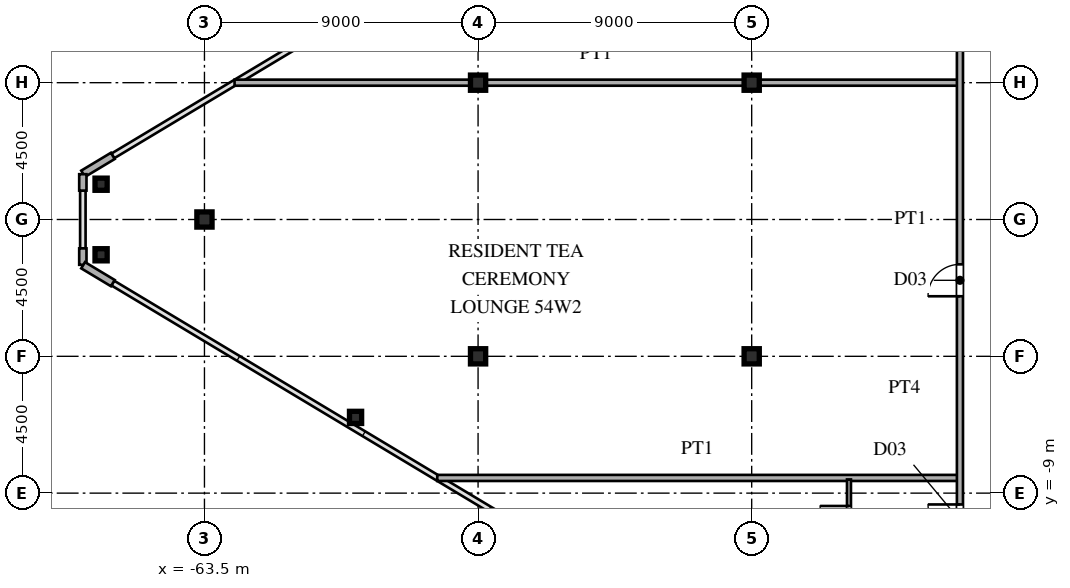
"""IFC4 building model, lengths in metres.
Left out: names, types, materials, properties, quantities, classifications, styles, units other than length and angle.
Written with IfcOpenShell. Run it as: python <this file> out.ifc"""

import sys

from ifc_helpers import new_model, si_unit, direction, frame, frame_2d, origin, origin_2d, place, context, subcontext, project, spatial, rectangle, hollow_rectangle, i_section, extrude, source, transform, mapped, element, fill, save


model = new_model("IFC4")
c1 = context("Model", 3, precision=1e-05, world=origin(), true_north=direction((0.0, 1.0)))
c2 = subcontext(c1, "Body", "Model", "MODEL_VIEW")
j1 = project(units=[si_unit("LENGTHUNIT", "METRE"), si_unit("PLANEANGLEUNIT", "RADIAN")], contexts=[c1])
p1 = place(None, origin())
s1 = spatial("IfcSite", under=j1, at=p1, CompositionType="ELEMENT")
p2 = place(p1, origin())
s2 = spatial("IfcBuilding", under=s1, at=p2, CompositionType="ELEMENT")
p3 = place(p2, frame((0.0, 0.0, 203.1)))
s3 = spatial("IfcBuildingStorey", under=s2, at=p3, CompositionType="ELEMENT", Elevation=203.1)
m1 = source(origin(), c2, "Body", "SweptSolid", [
    extrude(i_section(OverallWidth=0.5, OverallDepth=0.5, WebThickness=0.02, FlangeThickness=0.032, at=origin_2d()), origin(), (0.0, 0.0, 1.0), 3.6),
])
for number, where, z_axis, x_axis in (
    (1, (-45.5, -4.5, 0.0), (0.0, 0.0, 1.0), (1.0, 0.0, 0.0)),
    (2, (-45.5, 4.5, 0.0), (0.0, 0.0, 1.0), (1.0, 0.0, 0.0)),
    (3, (-54.5, -4.5, 0.0), (0.0, 0.0, 1.0), (1.0, 0.0, 0.0)),
    (4, (-54.5, 4.5, 0.0), (0.0, 0.0, 1.0), (1.0, 0.0, 0.0)),
    (5, (-63.5, 0.0, 0.0), (0.0, 0.0, 1.0), (1.0, 0.0, 0.0)),
):
    element("IfcColumn", number, at=place(p3, frame(where, z_axis=z_axis, x_axis=x_axis)), inside=s3, PredefinedType="COLUMN", context=c2, shape_type="MappedRepresentation", body=[
        mapped(m1, transform((0.0, 0.0, 0.0), scale=1.0)),
    ])
m2 = source(origin(), c2, "Body", "SweptSolid", [
    extrude(hollow_rectangle(XDim=0.4, YDim=0.4, WallThickness=0.016, at=origin_2d()), origin(), (0.0, 0.0, 1.0), 3.6),
])
for number, where, z_axis, x_axis in (
    (6, (-66.9, 1.16, 0.0), (0.0, 0.0, 1.0), (1.0, 0.0, 0.0)),
    (7, (-66.9, -1.16, 0.0), (0.0, 0.0, 1.0), (1.0, 0.0, 0.0)),
    (8, (-58.53, -6.509, 0.0), (0.0, 0.0, 1.0), (1.0, 0.0, 0.0)),
):
    element("IfcColumn", number, at=place(p3, frame(where, z_axis=z_axis, x_axis=x_axis)), inside=s3, PredefinedType="COLUMN", context=c2, shape_type="MappedRepresentation", body=[
        mapped(m2, transform((0.0, 0.0, 0.0), scale=1.0)),
    ])
p4 = place(p3, frame((-66.514, 2.092, 0.0), z_axis=(0.0, 0.0, 1.0), x_axis=(-0.85743623509, -0.514590228002, 0.0)))
e9 = element("IfcWall", 9, at=p4, inside=s3, PredefinedType="SOLIDWALL", context=c2, shape_type="SweptSolid", body=[
    extrude(rectangle(XDim=1.14, YDim=0.24, at=frame_2d((0.57, 0.0))), origin(), (0.0, 0.0, 1.0), 3.38),
])
for number, where, z_axis, x_axis in (
    (10, (-67.5, 1.49, 0.0), (0.0, 0.0, 1.0), (0.0, -1.0, 0.0)),
    (11, (-67.5, -0.95, 0.0), (0.0, 0.0, 1.0), (0.0, -1.0, 0.0)),
):
    element("IfcWall", number, at=place(p3, frame(where, z_axis=z_axis, x_axis=x_axis)), inside=s3, PredefinedType="SOLIDWALL", context=c2, shape_type="SweptSolid", body=[
        extrude(rectangle(XDim=0.54, YDim=0.24, at=frame_2d((0.27, 0.0))), origin(), (0.0, 0.0, 1.0), 3.38),
    ])
p5 = place(p3, frame((-67.491, -1.505, 0.0), z_axis=(0.0, 0.0, 1.0), x_axis=(0.85743623509, -0.514590228002, 0.0)))
e12 = element("IfcWall", 12, at=p5, inside=s3, PredefinedType="SOLIDWALL", context=c2, shape_type="SweptSolid", body=[
    extrude(rectangle(XDim=1.14, YDim=0.24, at=frame_2d((0.57, 0.0))), origin(), (0.0, 0.0, 1.0), 3.38),
])
p6 = place(p3, frame((-55.843, -8.5, 0.0), z_axis=(0.0, 0.0, 1.0), x_axis=(1.0, 0.0, 0.0)))
e13 = element("IfcWall", 13, at=p6, inside=s3, PredefinedType="PARTITIONING", context=c2, shape_type="SweptSolid", body=[
    extrude(rectangle(XDim=17.113, YDim=0.2, at=frame_2d((8.557, 0.0))), origin(), (0.0, 0.0, 1.0), 3.38),
])
p7 = place(p3, frame((-62.51, 4.5, 0.0), z_axis=(0.0, 0.0, 1.0), x_axis=(1.0, 0.0, 0.0)))
e14 = element("IfcWall", 14, at=p7, inside=s3, PredefinedType="PARTITIONING", context=c2, shape_type="SweptSolid", body=[
    extrude(rectangle(XDim=7.99, YDim=0.2, at=frame_2d((3.995, 0.0))), origin(), (0.0, 0.0, 1.0), 3.38),
])
p8 = place(p3, frame((-54.52, 4.5, 0.0), z_axis=(0.0, 0.0, 1.0), x_axis=(1.0, 0.0, 0.0)))
e15 = element("IfcWall", 15, at=p8, inside=s3, PredefinedType="PARTITIONING", context=c2, shape_type="SweptSolid", body=[
    extrude(rectangle(XDim=15.79, YDim=0.2, at=frame_2d((7.895, 0.0))), origin(), (0.0, 0.0, 1.0), 2.78),
])
p9 = place(p3, frame((-42.3, -16.655, 0.0), z_axis=(0.0, 0.0, 1.0), x_axis=(0.0, 1.0, 0.0)))
e16 = element("IfcWall", 16, at=p9, inside=s3, PredefinedType="PARTITIONING", context=c2, shape_type="SweptSolid", body=[
    extrude(rectangle(XDim=8.105, YDim=0.13, at=frame_2d((4.052, 0.0))), origin(), (0.0, 0.0, 1.0), 3.38),
])
p10 = place(p9, frame((6.282, 0.0, 0.0)))
e17 = element("IfcOpeningElement", 17, at=p10, cuts=e16, PredefinedType="OPENING", context=c2, shape_type="SweptSolid", body=[
    extrude(rectangle(XDim=0.95, YDim=2.15, at=frame_2d((0.475, 1.075))), frame((0.0, 0.075, 0.0), z_axis=(0.0, -1.0, 0.0), x_axis=(1.0, 0.0, 0.0)), (0.0, 0.0, 1.0), 0.15),
])
p11 = place(p9, frame((1.048, 0.0, 0.0)))
e18 = element("IfcOpeningElement", 18, at=p11, cuts=e16, PredefinedType="OPENING", context=c2, shape_type="SweptSolid", body=[
    extrude(rectangle(XDim=0.95, YDim=2.15, at=frame_2d((0.475, 1.075))), frame((0.0, 0.075, 0.0), z_axis=(0.0, -1.0, 0.0), x_axis=(1.0, 0.0, 0.0)), (0.0, 0.0, 1.0), 0.15),
])
p12 = place(p3, frame((-38.65, -15.715, 0.0), z_axis=(0.0, 0.0, 1.0), x_axis=(0.0, 1.0, 0.0)))
e19 = element("IfcWall", 19, at=p12, inside=s3, PredefinedType="PARTITIONING", context=c2, shape_type="SweptSolid", body=[
    extrude(rectangle(XDim=31.43, YDim=0.2, at=frame_2d((15.715, 0.0))), origin(), (0.0, 0.0, 1.0), 3.38),
])
p13 = place(p12, frame((5.292, 0.0, 0.0)))
e20 = element("IfcOpeningElement", 20, at=p13, cuts=e19, PredefinedType="OPENING", context=c2, shape_type="SweptSolid", body=[
    extrude(rectangle(XDim=1.05, YDim=2.25, at=frame_2d((0.525, 1.125))), frame((0.0, 0.11, 0.0), z_axis=(0.0, -1.0, 0.0), x_axis=(1.0, 0.0, 0.0)), (0.0, 0.0, 1.0), 0.22),
])
p14 = place(p12, frame((13.19, 0.0, 0.0)))
e21 = element("IfcOpeningElement", 21, at=p14, cuts=e19, PredefinedType="OPENING", context=c2, shape_type="SweptSolid", body=[
    extrude(rectangle(XDim=1.05, YDim=2.25, at=frame_2d((0.525, 1.125))), frame((0.0, 0.11, 0.0), z_axis=(0.0, -1.0, 0.0), x_axis=(1.0, 0.0, 0.0)), (0.0, 0.0, 1.0), 0.22),
])
p15 = place(p12, frame((25.34, 0.0, 0.0)))
e22 = element("IfcOpeningElement", 22, at=p15, cuts=e19, PredefinedType="OPENING", context=c2, shape_type="SweptSolid", body=[
    extrude(rectangle(XDim=1.05, YDim=2.25, at=frame_2d((0.525, 1.125))), frame((0.0, 0.11, 0.0), z_axis=(0.0, -1.0, 0.0), x_axis=(1.0, 0.0, 0.0)), (0.0, 0.0, 1.0), 0.22),
])
m3 = source(origin(), c2, "Body", "SweptSolid", [
    extrude(rectangle(XDim=0.95, YDim=2.15, at=frame_2d((0.475, 1.075))), frame((0.0, 0.025, 0.0), z_axis=(0.0, -1.0, 0.0), x_axis=(1.0, 0.0, 0.0)), (0.0, 0.0, 1.0), 0.05),
])
p16 = place(p10, origin())
e23 = element("IfcDoor", 23, at=p16, inside=s3, OperationType="SINGLE_SWING_RIGHT", PredefinedType="DOOR", context=c2, shape_type="MappedRepresentation", body=[
    mapped(m3, transform((0.0, 0.0, 0.0), scale=1.0)),
])
fill(e17, e23)
m4 = source(origin(), c2, "Body", "SweptSolid", [
    extrude(rectangle(XDim=1.05, YDim=2.25, at=frame_2d((0.525, 1.125))), frame((0.0, 0.025, 0.0), z_axis=(0.0, -1.0, 0.0), x_axis=(1.0, 0.0, 0.0)), (0.0, 0.0, 1.0), 0.05),
])
p17 = place(p13, origin())
e24 = element("IfcDoor", 24, at=p17, inside=s3, OperationType="SINGLE_SWING_RIGHT", PredefinedType="DOOR", context=c2, shape_type="MappedRepresentation", body=[
    mapped(m4, transform((0.0, 0.0, 0.0), scale=1.0)),
])
fill(e20, e24)
p18 = place(p14, origin())
e25 = element("IfcDoor", 25, at=p18, inside=s3, OperationType="SINGLE_SWING_LEFT", PredefinedType="DOOR", context=c2, shape_type="MappedRepresentation", body=[
    mapped(m4, transform((0.0, 0.0, 0.0), scale=1.0)),
])
fill(e21, e25)
save(model, sys.argv[1])
